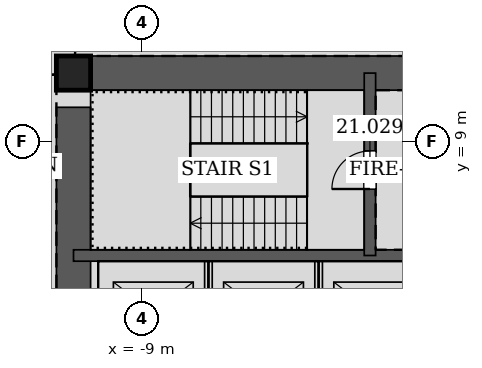
"""IFC4 building model, lengths in metres.
Left out: names, types, materials, properties, quantities, classifications, styles, units other than length and angle.
Written with IfcOpenShell. Run it as: python <this file> out.ifc"""

import sys

from ifc_helpers import new_model, si_unit, direction, frame, frame_2d, origin, origin_2d, place, context, subcontext, project, spatial, rectangle, hollow_rectangle, extrude, element, fill, save


model = new_model("IFC4")
c1 = context("Model", 3, precision=1e-05, world=origin(), true_north=direction((0.0, 1.0)))
c2 = subcontext(c1, "Body", "Model", "MODEL_VIEW")
j1 = project(units=[si_unit("LENGTHUNIT", "METRE"), si_unit("PLANEANGLEUNIT", "RADIAN")], contexts=[c1])
p1 = place(None, origin())
s1 = spatial("IfcSite", under=j1, at=p1, CompositionType="ELEMENT")
p2 = place(p1, origin())
s2 = spatial("IfcBuilding", under=s1, at=p2, CompositionType="ELEMENT")
p3 = place(p2, frame((0.0, 0.0, 96.0)))
s3 = spatial("IfcBuildingStorey", under=s2, at=p3, CompositionType="ELEMENT", Elevation=96.0)
p4 = place(p3, frame((-10.8, 10.8, 0.0), z_axis=(0.0, 0.0, 1.0), x_axis=(1.0, 0.0, 0.0)))
e1 = element("IfcColumn", 1, at=p4, inside=s3, PredefinedType="COLUMN", context=c2, shape_type="SweptSolid", body=[
    extrude(hollow_rectangle(XDim=0.9, YDim=0.9, WallThickness=0.06, at=origin_2d()), origin(), (0.0, 0.0, 1.0), 4.2),
])
p5 = place(p3, frame((10.8, 10.8, 0.0), z_axis=(0.0, 0.0, 1.0), x_axis=(-1.0, 0.0, 0.0)))
e2 = element("IfcWall", 2, at=p5, inside=s3, PredefinedType="SOLIDWALL", context=c2, shape_type="SweptSolid", body=[
    extrude(rectangle(XDim=21.6, YDim=0.9, at=frame_2d((10.8, 0.0))), origin(), (0.0, 0.0, 1.0), 4.2),
])
p6 = place(p5, frame((10.05, 0.0, 0.0)))
e3 = element("IfcOpeningElement", 3, at=p6, cuts=e2, PredefinedType="OPENING", context=c2, shape_type="SweptSolid", body=[
    extrude(rectangle(XDim=1.5, YDim=2.1, at=frame_2d((0.75, 1.05))), frame((0.0, 0.46, 0.0), z_axis=(0.0, -1.0, 0.0), x_axis=(1.0, 0.0, 0.0)), (0.0, 0.0, 1.0), 0.92),
])
p7 = place(p3, frame((-10.8, 10.8, 0.0), z_axis=(0.0, 0.0, 1.0), x_axis=(0.0, -1.0, 0.0)))
e4 = element("IfcWall", 4, at=p7, inside=s3, PredefinedType="SOLIDWALL", context=c2, shape_type="SweptSolid", body=[
    extrude(rectangle(XDim=21.6, YDim=0.9, at=frame_2d((10.8, 0.0))), origin(), (0.0, 0.0, 1.0), 4.2),
])
p8 = place(p7, frame((8.7, 0.0, 0.0)))
e5 = element("IfcOpeningElement", 5, at=p8, cuts=e4, PredefinedType="OPENING", context=c2, shape_type="SweptSolid", body=[
    extrude(rectangle(XDim=1.2, YDim=2.1, at=frame_2d((0.6, 1.05))), frame((0.0, 0.46, 0.0), z_axis=(0.0, -1.0, 0.0), x_axis=(1.0, 0.0, 0.0)), (0.0, 0.0, 1.0), 0.92),
])
p9 = place(p7, frame((11.7, 0.0, 0.0)))
e6 = element("IfcOpeningElement", 6, at=p9, cuts=e4, PredefinedType="OPENING", context=c2, shape_type="SweptSolid", body=[
    extrude(rectangle(XDim=1.2, YDim=2.1, at=frame_2d((0.6, 1.05))), frame((0.0, 0.46, 0.0), z_axis=(0.0, -1.0, 0.0), x_axis=(1.0, 0.0, 0.0)), (0.0, 0.0, 1.0), 0.92),
])
p10 = place(p3, frame((-10.8, 6.0, 0.0), z_axis=(0.0, 0.0, 1.0), x_axis=(1.0, 0.0, 0.0)))
e7 = element("IfcWall", 7, at=p10, inside=s3, PredefinedType="SOLIDWALL", context=c2, shape_type="SweptSolid", body=[
    extrude(rectangle(XDim=21.6, YDim=0.3, at=frame_2d((10.8, 0.0))), origin(), (0.0, 0.0, 1.0), 4.2),
])
p11 = place(p10, frame((10.25, 0.0, 0.0)))
e8 = element("IfcOpeningElement", 8, at=p11, cuts=e7, PredefinedType="OPENING", context=c2, shape_type="SweptSolid", body=[
    extrude(rectangle(XDim=1.1, YDim=2.1, at=frame_2d((0.55, 1.05))), frame((0.0, 0.16, 0.0), z_axis=(0.0, -1.0, 0.0), x_axis=(1.0, 0.0, 0.0)), (0.0, 0.0, 1.0), 0.32),
])
p12 = place(p3, frame((-3.0, 6.0, 0.0), z_axis=(0.0, 0.0, 1.0), x_axis=(0.0, 1.0, 0.0)))
e9 = element("IfcWall", 9, at=p12, inside=s3, PredefinedType="SOLIDWALL", context=c2, shape_type="SweptSolid", body=[
    extrude(rectangle(XDim=4.8, YDim=0.3, at=frame_2d((2.4, 0.0))), origin(), (0.0, 0.0, 1.0), 4.2),
])
p13 = place(p12, frame((1.75, 0.0, 0.0)))
e10 = element("IfcOpeningElement", 10, at=p13, cuts=e9, PredefinedType="OPENING", context=c2, shape_type="SweptSolid", body=[
    extrude(rectangle(XDim=1.0, YDim=2.1, at=frame_2d((0.5, 1.05))), frame((0.0, 0.16, 0.0), z_axis=(0.0, -1.0, 0.0), x_axis=(1.0, 0.0, 0.0)), (0.0, 0.0, 1.0), 0.32),
])
for number, where, z_axis, x_axis in (
    (11, (-7.25, 3.15, 0.0), (0.0, 0.0, 1.0), (0.0, 1.0, 0.0)),
    (12, (-4.35, 3.15, 0.0), (0.0, 0.0, 1.0), (0.0, 1.0, 0.0)),
):
    element("IfcWall", number, at=place(p3, frame(where, z_axis=z_axis, x_axis=x_axis)), inside=s3, PredefinedType="PARTITIONING", context=c2, shape_type="SweptSolid", body=[
        extrude(rectangle(XDim=2.7, YDim=0.2, at=frame_2d((1.35, 0.0))), origin(), (0.0, 0.0, 1.0), 4.2),
    ])
p14 = place(p13, origin())
e13 = element("IfcDoor", 13, at=p14, inside=s3, OperationType="SINGLE_SWING_LEFT", PredefinedType="DOOR", context=c2, shape_type="SweptSolid", body=[
    extrude(rectangle(XDim=1.0, YDim=2.1, at=frame_2d((0.5, 1.05))), frame((0.0, 0.025, 0.0), z_axis=(0.0, -1.0, 0.0), x_axis=(1.0, 0.0, 0.0)), (0.0, 0.0, 1.0), 0.05),
])
fill(e10, e13)
save(model, sys.argv[1])
